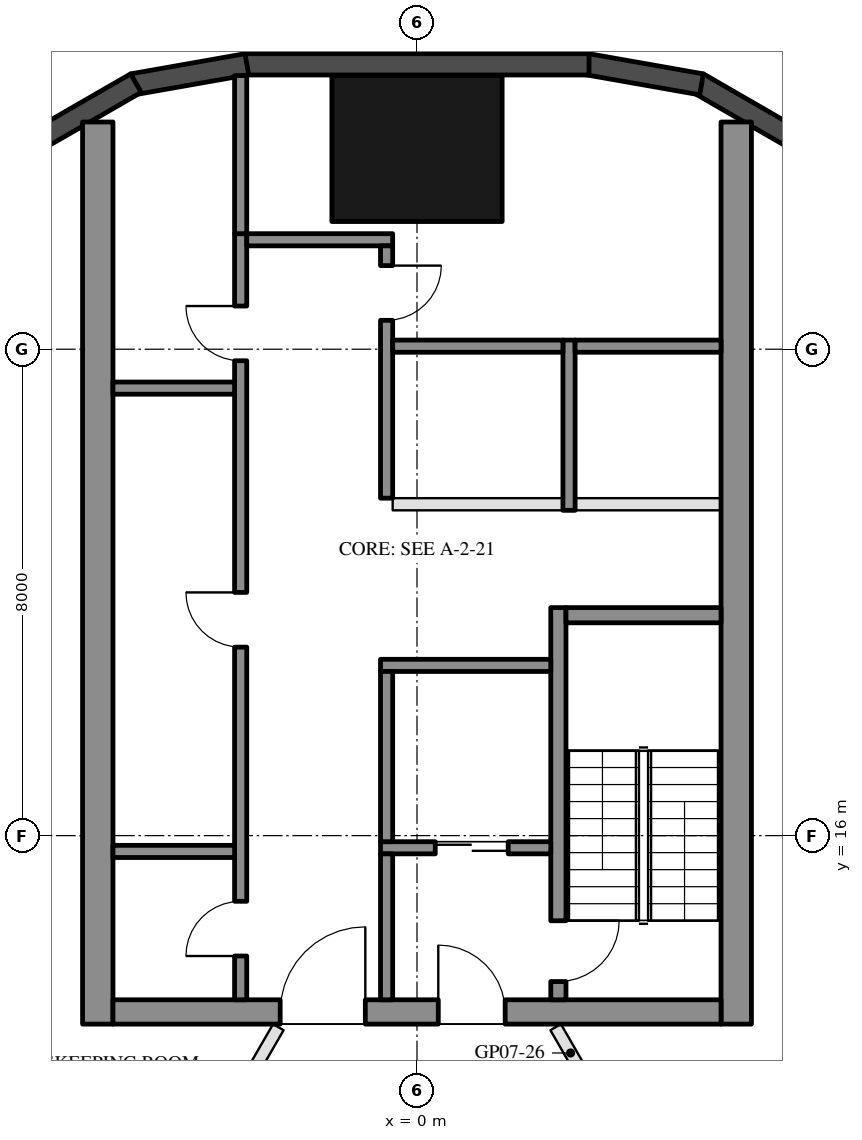
"""IFC4 building model, lengths in metres.
Left out: names, types, materials, properties, quantities, classifications, styles, units other than length and angle.
Written with IfcOpenShell. Run it as: python <this file> out.ifc"""

import sys

from ifc_helpers import new_model, si_unit, direction, frame, frame_2d, origin, origin_2d, place, context, subcontext, project, spatial, rectangle, hollow_rectangle, extrude, element, fill, save


model = new_model("IFC4")
c1 = context("Model", 3, precision=1e-05, world=origin(), true_north=direction((0.0, 1.0)))
c2 = subcontext(c1, "Body", "Model", "MODEL_VIEW")
j1 = project(units=[si_unit("LENGTHUNIT", "METRE"), si_unit("PLANEANGLEUNIT", "RADIAN")], contexts=[c1])
p1 = place(None, origin())
s1 = spatial("IfcSite", under=j1, at=p1, CompositionType="ELEMENT")
p2 = place(p1, origin())
s2 = spatial("IfcBuilding", under=s1, at=p2, CompositionType="ELEMENT")
p3 = place(p2, frame((0.0, 0.0, 98.3)))
s3 = spatial("IfcBuildingStorey", under=s2, at=p3, CompositionType="ELEMENT", Elevation=98.3)
p4 = place(p3, frame((0.0, 27.3, 0.0), z_axis=(0.0, 0.0, 1.0), x_axis=(1.0, 0.0, 0.0)))
e1 = element("IfcColumn", 1, at=p4, inside=s3, PredefinedType="COLUMN", context=c2, shape_type="SweptSolid", body=[
    extrude(hollow_rectangle(XDim=2.8, YDim=2.4, WallThickness=0.07, at=origin_2d()), origin(), (0.0, 0.0, 1.0), 3.7),
])
for number, where, z_axis, x_axis in (
    (2, (6.277, 27.422, 0.0), (0.0, 0.0, 1.0), (-0.866, 0.5, 0.0)),
    (3, (4.68, 28.356, 0.0), (0.0, 0.0, 1.0), (-0.985, 0.174, 0.0)),
):
    element("IfcWall", number, at=place(p3, frame(where, z_axis=z_axis, x_axis=x_axis)), inside=s3, PredefinedType="SOLIDWALL", context=c2, shape_type="SweptSolid", body=[
        extrude(rectangle(XDim=1.91, YDim=0.35, at=frame_2d((0.955, 0.0))), origin(), (0.0, 0.0, 1.0), 3.55),
    ])
p5 = place(p3, frame((2.829, 28.685, 0.0), z_axis=(0.0, 0.0, 1.0), x_axis=(-1.0, 0.0, 0.0)))
e4 = element("IfcWall", 4, at=p5, inside=s3, PredefinedType="SOLIDWALL", context=c2, shape_type="SweptSolid", body=[
    extrude(rectangle(XDim=5.658, YDim=0.35, at=frame_2d((2.829, 0.0))), origin(), (0.0, 0.0, 1.0), 3.55),
])
for number, where, z_axis, x_axis in (
    (5, (-2.799, 28.688, 0.0), (0.0, 0.0, 1.0), (-0.985, -0.174, 0.0)),
    (6, (-4.623, 28.377, 0.0), (0.0, 0.0, 1.0), (-0.866, -0.5, 0.0)),
):
    element("IfcWall", number, at=place(p3, frame(where, z_axis=z_axis, x_axis=x_axis)), inside=s3, PredefinedType="SOLIDWALL", context=c2, shape_type="SweptSolid", body=[
        extrude(rectangle(XDim=1.91, YDim=0.35, at=frame_2d((0.955, 0.0))), origin(), (0.0, 0.0, 1.0), 3.55),
    ])
for number, where, z_axis, x_axis in (
    (7, (5.25, 12.9, 0.0), (0.0, 0.0, 1.0), (0.0, 1.0, 0.0)),
    (8, (-5.25, 12.9, 0.0), (0.0, 0.0, 1.0), (0.0, 1.0, 0.0)),
):
    element("IfcWall", number, at=place(p3, frame(where, z_axis=z_axis, x_axis=x_axis)), inside=s3, PredefinedType="SHEAR", context=c2, shape_type="SweptSolid", body=[
        extrude(rectangle(XDim=14.837, YDim=0.5, at=frame_2d((7.418, 0.0))), origin(), (0.0, 0.0, 1.0), 3.5),
    ])
p6 = place(p3, frame((5.0, 13.1, 0.0), z_axis=(0.0, 0.0, 1.0), x_axis=(-1.0, 0.0, 0.0)))
e9 = element("IfcWall", 9, at=p6, inside=s3, PredefinedType="SHEAR", context=c2, shape_type="SweptSolid", body=[
    extrude(rectangle(XDim=10.0, YDim=0.4, at=frame_2d((5.0, 0.0))), origin(), (0.0, 0.0, 1.0), 3.5),
])
p7 = place(p6, frame((3.55, 0.0, 0.0)))
e10 = element("IfcOpeningElement", 10, at=p7, cuts=e9, PredefinedType="OPENING", context=c2, shape_type="SweptSolid", body=[
    extrude(rectangle(XDim=1.1, YDim=2.1, at=frame_2d((0.55, 1.05))), frame((0.0, 0.21, 0.0), z_axis=(0.0, -1.0, 0.0), x_axis=(1.0, 0.0, 0.0)), (0.0, 0.0, 1.0), 0.42),
])
p8 = place(p6, frame((5.85, 0.0, 0.0)))
e11 = element("IfcOpeningElement", 11, at=p8, cuts=e9, PredefinedType="OPENING", context=c2, shape_type="SweptSolid", body=[
    extrude(rectangle(XDim=1.4, YDim=2.1, at=frame_2d((0.7, 1.05))), frame((0.0, 0.21, 0.0), z_axis=(0.0, -1.0, 0.0), x_axis=(1.0, 0.0, 0.0)), (0.0, 0.0, 1.0), 0.42),
])
p9 = place(p3, frame((2.325, 13.3, 0.0), z_axis=(0.0, 0.0, 1.0), x_axis=(0.0, 1.0, 0.0)))
e12 = element("IfcWall", 12, at=p9, inside=s3, PredefinedType="SHEAR", context=c2, shape_type="SweptSolid", body=[
    extrude(rectangle(XDim=6.45, YDim=0.25, at=frame_2d((3.225, 0.0))), origin(), (0.0, 0.0, 1.0), 3.5),
])
p10 = place(p9, frame((0.3, 0.0, 0.0)))
e13 = element("IfcOpeningElement", 13, at=p10, cuts=e12, PredefinedType="OPENING", context=c2, shape_type="SweptSolid", body=[
    extrude(rectangle(XDim=1.0, YDim=2.1, at=frame_2d((0.5, 1.05))), frame((0.0, 0.135, 0.0), z_axis=(0.0, -1.0, 0.0), x_axis=(1.0, 0.0, 0.0)), (0.0, 0.0, 1.0), 0.27),
])
p11 = place(p3, frame((5.0, 19.625, 0.0), z_axis=(0.0, 0.0, 1.0), x_axis=(-1.0, 0.0, 0.0)))
e14 = element("IfcWall", 14, at=p11, inside=s3, PredefinedType="SHEAR", context=c2, shape_type="SweptSolid", body=[
    extrude(rectangle(XDim=2.55, YDim=0.25, at=frame_2d((1.275, 0.0))), origin(), (0.0, 0.0, 1.0), 3.5),
])
p12 = place(p3, frame((2.2, 18.8, 0.0), z_axis=(0.0, 0.0, 1.0), x_axis=(-1.0, 0.0, 0.0)))
e15 = element("IfcWall", 15, at=p12, inside=s3, PredefinedType="SHEAR", context=c2, shape_type="SweptSolid", body=[
    extrude(rectangle(XDim=2.8, YDim=0.2, at=frame_2d((1.4, 0.0))), origin(), (0.0, 0.0, 1.0), 3.5),
])
p13 = place(p3, frame((2.2, 15.8, 0.0), z_axis=(0.0, 0.0, 1.0), x_axis=(-1.0, 0.0, 0.0)))
e16 = element("IfcWall", 16, at=p13, inside=s3, PredefinedType="SHEAR", context=c2, shape_type="SweptSolid", body=[
    extrude(rectangle(XDim=2.8, YDim=0.2, at=frame_2d((1.4, 0.0))), origin(), (0.0, 0.0, 1.0), 3.5),
])
p14 = place(p13, frame((0.7, 0.0, 0.0)))
e17 = element("IfcOpeningElement", 17, at=p14, cuts=e16, PredefinedType="OPENING", context=c2, shape_type="SweptSolid", body=[
    extrude(rectangle(XDim=1.2, YDim=2.1, at=frame_2d((0.6, 1.05))), frame((0.0, 0.11, 0.0), z_axis=(0.0, -1.0, 0.0), x_axis=(1.0, 0.0, 0.0)), (0.0, 0.0, 1.0), 0.22),
])
p15 = place(p3, frame((-0.5, 15.9, 0.0), z_axis=(0.0, 0.0, 1.0), x_axis=(0.0, 1.0, 0.0)))
e18 = element("IfcWall", 18, at=p15, inside=s3, PredefinedType="SHEAR", context=c2, shape_type="SweptSolid", body=[
    extrude(rectangle(XDim=2.8, YDim=0.2, at=frame_2d((1.4, 0.0))), origin(), (0.0, 0.0, 1.0), 3.5),
])
p16 = place(p3, frame((-0.5, 13.3, 0.0), z_axis=(0.0, 0.0, 1.0), x_axis=(0.0, 1.0, 0.0)))
e19 = element("IfcWall", 19, at=p16, inside=s3, PredefinedType="SHEAR", context=c2, shape_type="SweptSolid", body=[
    extrude(rectangle(XDim=2.4, YDim=0.2, at=frame_2d((1.2, 0.0))), origin(), (0.0, 0.0, 1.0), 3.5),
])
p17 = place(p3, frame((-2.9, 13.3, 0.0), z_axis=(0.0, 0.0, 1.0), x_axis=(0.0, 1.0, 0.0)))
e20 = element("IfcWall", 20, at=p17, inside=s3, PredefinedType="SHEAR", context=c2, shape_type="SweptSolid", body=[
    extrude(rectangle(XDim=12.6, YDim=0.2, at=frame_2d((6.3, 0.0))), origin(), (0.0, 0.0, 1.0), 3.5),
])
p18 = place(p17, frame((0.72, 0.0, 0.0)))
e21 = element("IfcOpeningElement", 21, at=p18, cuts=e20, PredefinedType="OPENING", context=c2, shape_type="SweptSolid", body=[
    extrude(rectangle(XDim=0.9, YDim=2.1, at=frame_2d((0.45, 1.05))), frame((0.0, 0.11, 0.0), z_axis=(0.0, -1.0, 0.0), x_axis=(1.0, 0.0, 0.0)), (0.0, 0.0, 1.0), 0.22),
])
p19 = place(p17, frame((5.8, 0.0, 0.0)))
e22 = element("IfcOpeningElement", 22, at=p19, cuts=e20, PredefinedType="OPENING", context=c2, shape_type="SweptSolid", body=[
    extrude(rectangle(XDim=0.9, YDim=2.1, at=frame_2d((0.45, 1.05))), frame((0.0, 0.11, 0.0), z_axis=(0.0, -1.0, 0.0), x_axis=(1.0, 0.0, 0.0)), (0.0, 0.0, 1.0), 0.22),
])
p20 = place(p17, frame((10.51, 0.0, 0.0)))
e23 = element("IfcOpeningElement", 23, at=p20, cuts=e20, PredefinedType="OPENING", context=c2, shape_type="SweptSolid", body=[
    extrude(rectangle(XDim=0.9, YDim=2.1, at=frame_2d((0.45, 1.05))), frame((0.0, 0.11, 0.0), z_axis=(0.0, -1.0, 0.0), x_axis=(1.0, 0.0, 0.0)), (0.0, 0.0, 1.0), 0.22),
])
p21 = place(p3, frame((-0.4, 25.8, 0.0), z_axis=(0.0, 0.0, 1.0), x_axis=(-1.0, 0.0, 0.0)))
e24 = element("IfcWall", 24, at=p21, inside=s3, PredefinedType="SHEAR", context=c2, shape_type="SweptSolid", body=[
    extrude(rectangle(XDim=2.4, YDim=0.2, at=frame_2d((1.2, 0.0))), origin(), (0.0, 0.0, 1.0), 3.5),
])
p22 = place(p3, frame((-0.5, 21.55, 0.0), z_axis=(0.0, 0.0, 1.0), x_axis=(0.0, 1.0, 0.0)))
e25 = element("IfcWall", 25, at=p22, inside=s3, PredefinedType="SHEAR", context=c2, shape_type="SweptSolid", body=[
    extrude(rectangle(XDim=4.15, YDim=0.2, at=frame_2d((2.075, 0.0))), origin(), (0.0, 0.0, 1.0), 3.5),
])
p23 = place(p22, frame((2.925, 0.0, 0.0)))
e26 = element("IfcOpeningElement", 26, at=p23, cuts=e25, PredefinedType="OPENING", context=c2, shape_type="SweptSolid", body=[
    extrude(rectangle(XDim=0.9, YDim=2.1, at=frame_2d((0.45, 1.05))), frame((0.0, 0.11, 0.0), z_axis=(0.0, -1.0, 0.0), x_axis=(1.0, 0.0, 0.0)), (0.0, 0.0, 1.0), 0.22),
])
for number, where, z_axis, x_axis in (
    (27, (-3.0, 15.74, 0.0), (0.0, 0.0, 1.0), (-1.0, 0.0, 0.0)),
    (28, (-3.0, 23.36, 0.0), (0.0, 0.0, 1.0), (-1.0, 0.0, 0.0)),
):
    element("IfcWall", number, at=place(p3, frame(where, z_axis=z_axis, x_axis=x_axis)), inside=s3, PredefinedType="SHEAR", context=c2, shape_type="SweptSolid", body=[
        extrude(rectangle(XDim=2.0, YDim=0.2, at=frame_2d((1.0, 0.0))), origin(), (0.0, 0.0, 1.0), 3.5),
    ])
p24 = place(p3, frame((-2.9, 25.9, 0.0), z_axis=(0.0, 0.0, 1.0), x_axis=(0.0, 1.0, 0.0)))
e29 = element("IfcWall", 29, at=p24, inside=s3, PredefinedType="SHEAR", context=c2, shape_type="SweptSolid", body=[
    extrude(rectangle(XDim=2.6, YDim=0.2, at=frame_2d((1.3, 0.0))), origin(), (0.0, 0.0, 1.0), 3.5),
])
p25 = place(p3, frame((2.5, 21.35, 0.0), z_axis=(0.0, 0.0, 1.0), x_axis=(0.0, 1.0, 0.0)))
e30 = element("IfcWall", 30, at=p25, inside=s3, PredefinedType="SHEAR", context=c2, shape_type="SweptSolid", body=[
    extrude(rectangle(XDim=2.8, YDim=0.2, at=frame_2d((1.4, 0.0))), origin(), (0.0, 0.0, 1.0), 3.5),
])
p26 = place(p3, frame((5.0, 24.05, 0.0), z_axis=(0.0, 0.0, 1.0), x_axis=(-1.0, 0.0, 0.0)))
e31 = element("IfcWall", 31, at=p26, inside=s3, PredefinedType="SHEAR", context=c2, shape_type="SweptSolid", body=[
    extrude(rectangle(XDim=2.4, YDim=0.2, at=frame_2d((1.2, 0.0))), origin(), (0.0, 0.0, 1.0), 3.5),
])
p27 = place(p3, frame((2.4, 24.05, 0.0), z_axis=(0.0, 0.0, 1.0), x_axis=(-1.0, 0.0, 0.0)))
e32 = element("IfcWall", 32, at=p27, inside=s3, PredefinedType="SHEAR", context=c2, shape_type="SweptSolid", body=[
    extrude(rectangle(XDim=2.8, YDim=0.2, at=frame_2d((1.4, 0.0))), origin(), (0.0, 0.0, 1.0), 3.5),
])
p28 = place(p3, frame((5.0, 21.45, 0.0), z_axis=(0.0, 0.0, 1.0), x_axis=(-1.0, 0.0, 0.0)))
e33 = element("IfcWall", 33, at=p28, inside=s3, PredefinedType="PARTITIONING", context=c2, shape_type="SweptSolid", body=[
    extrude(rectangle(XDim=2.4, YDim=0.2, at=frame_2d((1.2, 0.0))), origin(), (0.0, 0.0, 1.0), 3.5),
])
p29 = place(p3, frame((2.4, 21.45, 0.0), z_axis=(0.0, 0.0, 1.0), x_axis=(-1.0, 0.0, 0.0)))
e34 = element("IfcWall", 34, at=p29, inside=s3, PredefinedType="PARTITIONING", context=c2, shape_type="SweptSolid", body=[
    extrude(rectangle(XDim=2.8, YDim=0.2, at=frame_2d((1.4, 0.0))), origin(), (0.0, 0.0, 1.0), 3.5),
])
p30 = place(p3, frame((13.797, 14.663, 0.0), z_axis=(0.0, 0.0, 1.0), x_axis=(-0.866027479907, -0.499996404033, 0.0)))
e35 = element("IfcWall", 35, at=p30, inside=s3, PredefinedType="PARTITIONING", context=c2, shape_type="SweptSolid", body=[
    extrude(rectangle(XDim=10.98, YDim=0.2, at=frame_2d((5.49, 0.0))), origin(), (0.0, 0.0, 1.0), 2.96),
])
p31 = place(p3, frame((-13.928, 12.636, 0.0), z_axis=(0.0, 0.0, 1.0), x_axis=(0.881791431821, -0.471639555981, 0.0)))
e36 = element("IfcWall", 36, at=p31, inside=s3, PredefinedType="PARTITIONING", context=c2, shape_type="SweptSolid", body=[
    extrude(rectangle(XDim=10.085, YDim=0.2, at=frame_2d((5.042, 0.0))), origin(), (0.0, 0.0, 1.0), 2.95),
])
p32 = place(p3, frame((2.281, 12.85, 0.0), z_axis=(0.0, 0.0, 1.0), x_axis=(0.500011931275, -0.86601851515, 0.0)))
e37 = element("IfcWall", 37, at=p32, inside=s3, PredefinedType="PARTITIONING", context=c2, shape_type="SweptSolid", body=[
    extrude(rectangle(XDim=4.088, YDim=0.2, at=frame_2d((2.044, 0.0))), origin(), (0.0, 0.0, 1.0), 2.95),
])
p33 = place(p32, frame((1.544, 0.0, 0.0)))
e38 = element("IfcOpeningElement", 38, at=p33, cuts=e37, PredefinedType="OPENING", context=c2, shape_type="SweptSolid", body=[
    extrude(rectangle(XDim=1.0, YDim=2.1, at=frame_2d((0.5, 1.05))), frame((0.0, 0.11, 0.0), z_axis=(0.0, -1.0, 0.0), x_axis=(1.0, 0.0, 0.0)), (0.0, 0.0, 1.0), 0.22),
])
p34 = place(p3, frame((-5.073, 8.013, 0.0), z_axis=(0.0, 0.0, 1.0), x_axis=(0.500003731568, 0.866023249352, 0.0)))
e39 = element("IfcWall", 39, at=p34, inside=s3, PredefinedType="PARTITIONING", context=c2, shape_type="SweptSolid", body=[
    extrude(rectangle(XDim=5.585, YDim=0.2, at=frame_2d((2.792, 0.0))), origin(), (0.0, 0.0, 1.0), 2.95),
])
p35 = place(p34, frame((2.292, 0.0, 0.0)))
e40 = element("IfcOpeningElement", 40, at=p35, cuts=e39, PredefinedType="OPENING", context=c2, shape_type="SweptSolid", body=[
    extrude(rectangle(XDim=1.0, YDim=2.1, at=frame_2d((0.5, 1.05))), frame((0.0, 0.11, 0.0), z_axis=(0.0, -1.0, 0.0), x_axis=(1.0, 0.0, 0.0)), (0.0, 0.0, 1.0), 0.22),
])
p36 = place(p14, origin())
e41 = element("IfcDoor", 41, at=p36, inside=s3, OperationType="DOUBLE_DOOR_SLIDING", PredefinedType="DOOR", context=c2, shape_type="SweptSolid", body=[
    extrude(rectangle(XDim=1.2, YDim=2.1, at=frame_2d((0.6, 1.05))), frame((0.0, 0.025, 0.0), z_axis=(0.0, -1.0, 0.0), x_axis=(1.0, 0.0, 0.0)), (0.0, 0.0, 1.0), 0.05),
])
fill(e17, e41)
p37 = place(p18, origin())
e42 = element("IfcDoor", 42, at=p37, inside=s3, OperationType="SINGLE_SWING_LEFT", PredefinedType="DOOR", context=c2, shape_type="SweptSolid", body=[
    extrude(rectangle(XDim=0.9, YDim=2.1, at=frame_2d((0.45, 1.05))), frame((0.0, 0.025, 0.0), z_axis=(0.0, -1.0, 0.0), x_axis=(1.0, 0.0, 0.0)), (0.0, 0.0, 1.0), 0.05),
])
fill(e21, e42)
p38 = place(p19, origin())
e43 = element("IfcDoor", 43, at=p38, inside=s3, OperationType="SINGLE_SWING_RIGHT", PredefinedType="DOOR", context=c2, shape_type="SweptSolid", body=[
    extrude(rectangle(XDim=0.9, YDim=2.1, at=frame_2d((0.45, 1.05))), frame((0.0, 0.025, 0.0), z_axis=(0.0, -1.0, 0.0), x_axis=(1.0, 0.0, 0.0)), (0.0, 0.0, 1.0), 0.05),
])
fill(e22, e43)
p39 = place(p20, origin())
e44 = element("IfcDoor", 44, at=p39, inside=s3, OperationType="SINGLE_SWING_RIGHT", PredefinedType="DOOR", context=c2, shape_type="SweptSolid", body=[
    extrude(rectangle(XDim=0.9, YDim=2.1, at=frame_2d((0.45, 1.05))), frame((0.0, 0.025, 0.0), z_axis=(0.0, -1.0, 0.0), x_axis=(1.0, 0.0, 0.0)), (0.0, 0.0, 1.0), 0.05),
])
fill(e23, e44)
p40 = place(p23, frame((0.9, 0.0, 0.0), z_axis=(0.0, 0.0, 1.0), x_axis=(-1.0, 0.0, 0.0)))
e45 = element("IfcDoor", 45, at=p40, inside=s3, OperationType="SINGLE_SWING_LEFT", PredefinedType="DOOR", context=c2, shape_type="SweptSolid", body=[
    extrude(rectangle(XDim=0.9, YDim=2.1, at=frame_2d((0.45, 1.05))), frame((0.0, 0.025, 0.0), z_axis=(0.0, -1.0, 0.0), x_axis=(1.0, 0.0, 0.0)), (0.0, 0.0, 1.0), 0.05),
])
fill(e26, e45)
p41 = place(p7, frame((1.1, 0.0, 0.0), z_axis=(0.0, 0.0, 1.0), x_axis=(-1.0, 0.0, 0.0)))
e46 = element("IfcDoor", 46, at=p41, inside=s3, OperationType="SINGLE_SWING_LEFT", PredefinedType="DOOR", context=c2, shape_type="SweptSolid", body=[
    extrude(rectangle(XDim=1.1, YDim=2.1, at=frame_2d((0.55, 1.05))), frame((0.0, 0.025, 0.0), z_axis=(0.0, -1.0, 0.0), x_axis=(1.0, 0.0, 0.0)), (0.0, 0.0, 1.0), 0.05),
])
fill(e10, e46)
p42 = place(p8, frame((1.4, 0.0, 0.0), z_axis=(0.0, 0.0, 1.0), x_axis=(-1.0, 0.0, 0.0)))
e47 = element("IfcDoor", 47, at=p42, inside=s3, OperationType="DOUBLE_DOOR_SINGLE_SWING", PredefinedType="DOOR", context=c2, shape_type="SweptSolid", body=[
    extrude(rectangle(XDim=1.4, YDim=2.1, at=frame_2d((0.7, 1.05))), frame((0.0, 0.025, 0.0), z_axis=(0.0, -1.0, 0.0), x_axis=(1.0, 0.0, 0.0)), (0.0, 0.0, 1.0), 0.05),
])
fill(e11, e47)
p43 = place(p10, frame((1.0, 0.0, 0.0), z_axis=(0.0, 0.0, 1.0), x_axis=(-1.0, 0.0, 0.0)))
e48 = element("IfcDoor", 48, at=p43, inside=s3, OperationType="SINGLE_SWING_LEFT", PredefinedType="DOOR", context=c2, shape_type="SweptSolid", body=[
    extrude(rectangle(XDim=1.0, YDim=2.1, at=frame_2d((0.5, 1.05))), frame((0.0, 0.025, 0.0), z_axis=(0.0, -1.0, 0.0), x_axis=(1.0, 0.0, 0.0)), (0.0, 0.0, 1.0), 0.05),
])
fill(e13, e48)
save(model, sys.argv[1])
